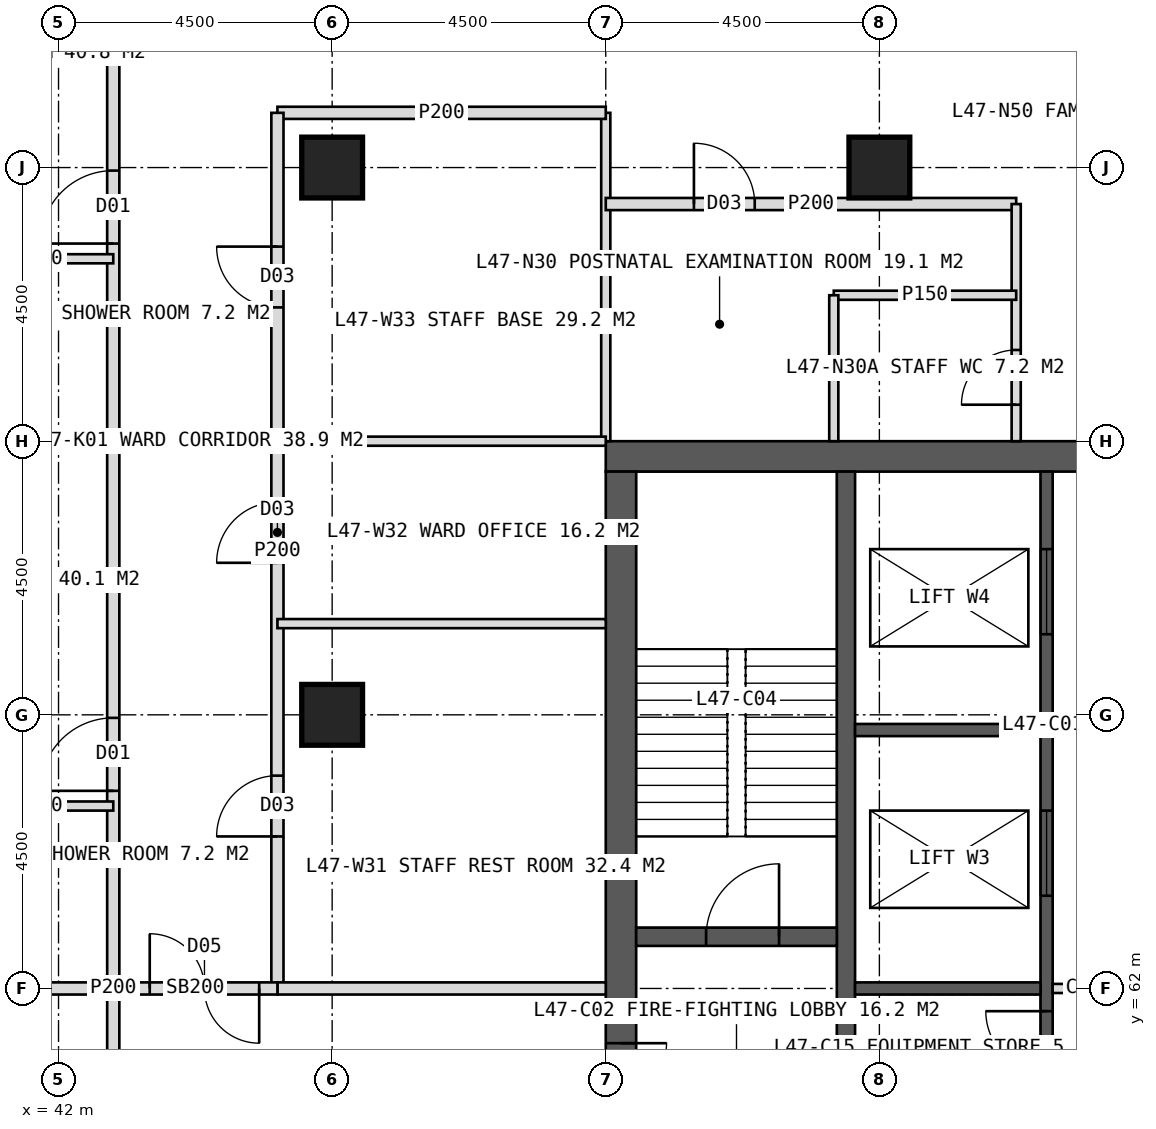
"""IFC4 building model, lengths in metres.
Left out: names, types, materials, properties, quantities, classifications, styles, units other than length and angle.
Written with IfcOpenShell. Run it as: python <this file> out.ifc"""

import sys

from ifc_helpers import new_model, si_unit, direction, frame, frame_2d, origin, origin_2d, place, context, subcontext, project, spatial, rectangle, hollow_rectangle, extrude, element, fill, save


model = new_model("IFC4")
c1 = context("Model", 3, precision=1e-05, world=origin(), true_north=direction((0.0, 1.0)))
c2 = subcontext(c1, "Body", "Model", "MODEL_VIEW")
j1 = project(units=[si_unit("LENGTHUNIT", "METRE"), si_unit("PLANEANGLEUNIT", "RADIAN")], contexts=[c1])
p1 = place(None, origin())
s1 = spatial("IfcSite", under=j1, at=p1, CompositionType="ELEMENT")
p2 = place(p1, origin())
s2 = spatial("IfcBuilding", under=s1, at=p2, CompositionType="ELEMENT")
p3 = place(p2, frame((0.0, 0.0, 197.0)))
s3 = spatial("IfcBuildingStorey", under=s2, at=p3, CompositionType="ELEMENT", Elevation=197.0)
p4 = place(p3, frame((51.0, 70.75, 0.0), z_axis=(0.0, 0.0, 1.0), x_axis=(1.0, 0.0, 0.0)))
e1 = element("IfcWall", 1, at=p4, inside=s3, PredefinedType="SHEAR", context=c2, shape_type="SweptSolid", body=[
    extrude(rectangle(XDim=18.0, YDim=0.5, at=frame_2d((9.0, 0.0))), origin(), (0.0, 0.0, 1.0), 4.0),
])
p5 = place(p4, frame((8.1, 0.0, 0.0)))
e2 = element("IfcOpeningElement", 2, at=p5, cuts=e1, PredefinedType="OPENING", context=c2, shape_type="SweptSolid", body=[
    extrude(rectangle(XDim=1.8, YDim=2.2, at=frame_2d((0.9, 1.1))), frame((0.0, 0.26, 0.0), z_axis=(0.0, -1.0, 0.0), x_axis=(1.0, 0.0, 0.0)), (0.0, 0.0, 1.0), 0.52),
])
p6 = place(p3, frame((51.25, 53.5, 0.0), z_axis=(0.0, 0.0, 1.0), x_axis=(0.0, 1.0, 0.0)))
e3 = element("IfcWall", 3, at=p6, inside=s3, PredefinedType="SHEAR", context=c2, shape_type="SweptSolid", body=[
    extrude(rectangle(XDim=17.0, YDim=0.5, at=frame_2d((8.5, 0.0))), origin(), (0.0, 0.0, 1.0), 4.0),
])
p7 = place(p6, frame((6.1, 0.0, 0.0)))
e4 = element("IfcOpeningElement", 4, at=p7, cuts=e3, PredefinedType="OPENING", context=c2, shape_type="SweptSolid", body=[
    extrude(rectangle(XDim=1.5, YDim=2.2, at=frame_2d((0.75, 1.1))), frame((0.0, 0.26, 0.0), z_axis=(0.0, -1.0, 0.0), x_axis=(1.0, 0.0, 0.0)), (0.0, 0.0, 1.0), 0.52),
])
p8 = place(p3, frame((54.95, 53.5, 0.0), z_axis=(0.0, 0.0, 1.0), x_axis=(0.0, 1.0, 0.0)))
e5 = element("IfcWall", 5, at=p8, inside=s3, PredefinedType="SHEAR", context=c2, shape_type="SweptSolid", body=[
    extrude(rectangle(XDim=17.0, YDim=0.3, at=frame_2d((8.5, 0.0))), origin(), (0.0, 0.0, 1.0), 4.0),
])
p9 = place(p3, frame((58.25, 53.5, 0.0), z_axis=(0.0, 0.0, 1.0), x_axis=(0.0, 1.0, 0.0)))
e6 = element("IfcWall", 6, at=p9, inside=s3, PredefinedType="SHEAR", context=c2, shape_type="SweptSolid", body=[
    extrude(rectangle(XDim=17.0, YDim=0.2, at=frame_2d((8.5, 0.0))), origin(), (0.0, 0.0, 1.0), 4.0),
])
p10 = place(p9, frame((0.496, 0.0, 0.0)))
e7 = element("IfcOpeningElement", 7, at=p10, cuts=e6, PredefinedType="OPENING", context=c2, shape_type="SweptSolid", body=[
    extrude(rectangle(XDim=1.0, YDim=2.1, at=frame_2d((0.5, 1.05))), frame((0.0, 0.11, 0.0), z_axis=(0.0, -1.0, 0.0), x_axis=(1.0, 0.0, 0.0)), (0.0, 0.0, 1.0), 0.22),
])
p11 = place(p9, frame((2.646, 0.0, 0.0)))
e8 = element("IfcOpeningElement", 8, at=p11, cuts=e6, PredefinedType="OPENING", context=c2, shape_type="SweptSolid", body=[
    extrude(rectangle(XDim=1.0, YDim=2.1, at=frame_2d((0.5, 1.05))), frame((0.0, 0.11, 0.0), z_axis=(0.0, -1.0, 0.0), x_axis=(1.0, 0.0, 0.0)), (0.0, 0.0, 1.0), 0.22),
])
p12 = place(p9, frame((5.027, 0.0, 0.0)))
e9 = element("IfcOpeningElement", 9, at=p12, cuts=e6, PredefinedType="OPENING", context=c2, shape_type="SweptSolid", body=[
    extrude(rectangle(XDim=1.0, YDim=2.1, at=frame_2d((0.5, 1.05))), frame((0.0, 0.11, 0.0), z_axis=(0.0, -1.0, 0.0), x_axis=(1.0, 0.0, 0.0)), (0.0, 0.0, 1.0), 0.22),
])
p13 = place(p9, frame((7.126, 0.0, 0.0)))
e10 = element("IfcOpeningElement", 10, at=p13, cuts=e6, PredefinedType="OPENING", context=c2, shape_type="SweptSolid", body=[
    extrude(rectangle(XDim=1.0, YDim=2.1, at=frame_2d((0.5, 1.05))), frame((0.0, 0.11, 0.0), z_axis=(0.0, -1.0, 0.0), x_axis=(1.0, 0.0, 0.0)), (0.0, 0.0, 1.0), 0.22),
])
p14 = place(p9, frame((10.025, 0.0, 0.0)))
e11 = element("IfcOpeningElement", 11, at=p14, cuts=e6, PredefinedType="OPENING", context=c2, shape_type="SweptSolid", body=[
    extrude(rectangle(XDim=1.4, YDim=2.2, at=frame_2d((0.7, 1.1))), frame((0.0, 0.11, 0.0), z_axis=(0.0, -1.0, 0.0), x_axis=(1.0, 0.0, 0.0)), (0.0, 0.0, 1.0), 0.22),
])
p15 = place(p9, frame((14.325, 0.0, 0.0)))
e12 = element("IfcOpeningElement", 12, at=p15, cuts=e6, PredefinedType="OPENING", context=c2, shape_type="SweptSolid", body=[
    extrude(rectangle(XDim=1.4, YDim=2.2, at=frame_2d((0.7, 1.1))), frame((0.0, 0.11, 0.0), z_axis=(0.0, -1.0, 0.0), x_axis=(1.0, 0.0, 0.0)), (0.0, 0.0, 1.0), 0.22),
])
for number, where, z_axis, x_axis in (
    (13, (55.1, 62.0, 0.0), (0.0, 0.0, 1.0), (1.0, 0.0, 0.0)),
    (14, (55.1, 66.25, 0.0), (0.0, 0.0, 1.0), (1.0, 0.0, 0.0)),
):
    element("IfcWall", number, at=place(p3, frame(where, z_axis=z_axis, x_axis=x_axis)), inside=s3, PredefinedType="SHEAR", context=c2, shape_type="SweptSolid", body=[
        extrude(rectangle(XDim=3.05, YDim=0.2, at=frame_2d((1.525, 0.0))), origin(), (0.0, 0.0, 1.0), 4.0),
    ])
p16 = place(p3, frame((51.5, 62.85, 0.0), z_axis=(0.0, 0.0, 1.0), x_axis=(1.0, 0.0, 0.0)))
e15 = element("IfcWall", 15, at=p16, inside=s3, PredefinedType="SHEAR", context=c2, shape_type="SweptSolid", body=[
    extrude(rectangle(XDim=3.3, YDim=0.3, at=frame_2d((1.65, 0.0))), origin(), (0.0, 0.0, 1.0), 4.0),
])
p17 = place(p16, frame((1.15, 0.0, 0.0)))
e16 = element("IfcOpeningElement", 16, at=p17, cuts=e15, PredefinedType="OPENING", context=c2, shape_type="SweptSolid", body=[
    extrude(rectangle(XDim=1.2, YDim=2.1, at=frame_2d((0.6, 1.05))), frame((0.0, 0.16, 0.0), z_axis=(0.0, -1.0, 0.0), x_axis=(1.0, 0.0, 0.0)), (0.0, 0.0, 1.0), 0.32),
])
for number, where, z_axis, x_axis in (
    (17, (46.5, 75.5, 0.0), (0.0, 0.0, 1.0), (1.0, 0.0, 0.0)),
    (18, (55.5, 75.5, 0.0), (0.0, 0.0, 1.0), (1.0, 0.0, 0.0)),
    (19, (46.5, 66.5, 0.0), (0.0, 0.0, 1.0), (1.0, 0.0, 0.0)),
):
    element("IfcColumn", number, at=place(p3, frame(where, z_axis=z_axis, x_axis=x_axis)), inside=s3, PredefinedType="COLUMN", context=c2, shape_type="SweptSolid", body=[
        extrude(hollow_rectangle(XDim=1.0, YDim=1.0, WallThickness=0.1, at=origin_2d()), origin(), (0.0, 0.0, 1.0), 4.0),
    ])
p18 = place(p3, frame((51.0, 71.0, 0.0), z_axis=(0.0, 0.0, 1.0), x_axis=(0.0, 1.0, 0.0)))
e20 = element("IfcWall", 20, at=p18, inside=s3, PredefinedType="PARTITIONING", context=c2, shape_type="SweptSolid", body=[
    extrude(rectangle(XDim=5.4, YDim=0.15, at=frame_2d((2.7, 0.0))), origin(), (0.0, 0.0, 1.0), 3.75),
])
p19 = place(p3, frame((45.6, 76.4, 0.0), z_axis=(0.0, 0.0, 1.0), x_axis=(1.0, 0.0, 0.0)))
e21 = element("IfcWall", 21, at=p19, inside=s3, PredefinedType="PARTITIONING", context=c2, shape_type="SweptSolid", body=[
    extrude(rectangle(XDim=5.4, YDim=0.2, at=frame_2d((2.7, 0.0))), origin(), (0.0, 0.0, 1.0), 3.75),
])
p20 = place(p3, frame((51.0, 74.9, 0.0), z_axis=(0.0, 0.0, 1.0), x_axis=(1.0, 0.0, 0.0)))
e22 = element("IfcWall", 22, at=p20, inside=s3, PredefinedType="PARTITIONING", context=c2, shape_type="SweptSolid", body=[
    extrude(rectangle(XDim=6.75, YDim=0.2, at=frame_2d((3.375, 0.0))), origin(), (0.0, 0.0, 1.0), 3.75),
])
p21 = place(p20, frame((1.45, 0.0, 0.0)))
e23 = element("IfcOpeningElement", 23, at=p21, cuts=e22, PredefinedType="OPENING", context=c2, shape_type="SweptSolid", body=[
    extrude(rectangle(XDim=1.0, YDim=2.1, at=frame_2d((0.5, 1.05))), frame((0.0, 0.11, 0.0), z_axis=(0.0, -1.0, 0.0), x_axis=(1.0, 0.0, 0.0)), (0.0, 0.0, 1.0), 0.22),
])
p22 = place(p3, frame((57.75, 71.0, 0.0), z_axis=(0.0, 0.0, 1.0), x_axis=(0.0, 1.0, 0.0)))
e24 = element("IfcWall", 24, at=p22, inside=s3, PredefinedType="PARTITIONING", context=c2, shape_type="SweptSolid", body=[
    extrude(rectangle(XDim=3.9, YDim=0.15, at=frame_2d((1.95, 0.0))), origin(), (0.0, 0.0, 1.0), 3.75),
])
p23 = place(p22, frame((0.6, 0.0, 0.0)))
e25 = element("IfcOpeningElement", 25, at=p23, cuts=e24, PredefinedType="OPENING", context=c2, shape_type="SweptSolid", body=[
    extrude(rectangle(XDim=0.9, YDim=2.1, at=frame_2d((0.45, 1.05))), frame((0.0, 0.085, 0.0), z_axis=(0.0, -1.0, 0.0), x_axis=(1.0, 0.0, 0.0)), (0.0, 0.0, 1.0), 0.17),
])
p24 = place(p3, frame((54.75, 73.4, 0.0), z_axis=(0.0, 0.0, 1.0), x_axis=(1.0, 0.0, 0.0)))
e26 = element("IfcWall", 26, at=p24, inside=s3, PredefinedType="PARTITIONING", context=c2, shape_type="SweptSolid", body=[
    extrude(rectangle(XDim=3.0, YDim=0.15, at=frame_2d((1.5, 0.0))), origin(), (0.0, 0.0, 1.0), 3.75),
])
p25 = place(p3, frame((54.75, 71.0, 0.0), z_axis=(0.0, 0.0, 1.0), x_axis=(0.0, 1.0, 0.0)))
e27 = element("IfcWall", 27, at=p25, inside=s3, PredefinedType="PARTITIONING", context=c2, shape_type="SweptSolid", body=[
    extrude(rectangle(XDim=2.4, YDim=0.15, at=frame_2d((1.2, 0.0))), origin(), (0.0, 0.0, 1.0), 3.75),
])
p26 = place(p3, frame((42.9, 62.0, 0.0), z_axis=(0.0, 0.0, 1.0), x_axis=(-1.0, 0.0, 0.0)))
e28 = element("IfcWall", 28, at=p26, inside=s3, PredefinedType="SOLIDWALL", context=c2, shape_type="SweptSolid", body=[
    extrude(rectangle(XDim=5.25, YDim=0.2, at=frame_2d((2.625, 0.0))), origin(), (0.0, 0.0, 1.0), 2.95),
])
p27 = place(p3, frame((42.9, 71.0, 0.0), z_axis=(0.0, 0.0, 1.0), x_axis=(-1.0, 0.0, 0.0)))
e29 = element("IfcWall", 29, at=p27, inside=s3, PredefinedType="PARTITIONING", context=c2, shape_type="SweptSolid", body=[
    extrude(rectangle(XDim=5.25, YDim=0.15, at=frame_2d((2.625, 0.0))), origin(), (0.0, 0.0, 1.0), 3.75),
])
p28 = place(p3, frame((42.9, 44.9, 0.0), z_axis=(0.0, 0.0, 1.0), x_axis=(0.0, 1.0, 0.0)))
e30 = element("IfcWall", 30, at=p28, inside=s3, PredefinedType="PARTITIONING", context=c2, shape_type="SweptSolid", body=[
    extrude(rectangle(XDim=34.2, YDim=0.2, at=frame_2d((17.1, 0.0))), origin(), (0.0, 0.0, 1.0), 3.75),
])
p29 = place(p28, frame((3.25, 0.0, 0.0)))
e31 = element("IfcOpeningElement", 31, at=p29, cuts=e30, PredefinedType="OPENING", context=c2, shape_type="SweptSolid", body=[
    extrude(rectangle(XDim=1.2, YDim=2.2, at=frame_2d((0.6, 1.1))), frame((0.0, 0.11, 0.0), z_axis=(0.0, -1.0, 0.0), x_axis=(1.0, 0.0, 0.0)), (0.0, 0.0, 1.0), 0.22),
])
p30 = place(p28, frame((11.35, 0.0, 0.0)))
e32 = element("IfcOpeningElement", 32, at=p30, cuts=e30, PredefinedType="OPENING", context=c2, shape_type="SweptSolid", body=[
    extrude(rectangle(XDim=1.2, YDim=2.2, at=frame_2d((0.6, 1.1))), frame((0.0, 0.11, 0.0), z_axis=(0.0, -1.0, 0.0), x_axis=(1.0, 0.0, 0.0)), (0.0, 0.0, 1.0), 0.22),
])
p31 = place(p28, frame((20.35, 0.0, 0.0)))
e33 = element("IfcOpeningElement", 33, at=p31, cuts=e30, PredefinedType="OPENING", context=c2, shape_type="SweptSolid", body=[
    extrude(rectangle(XDim=1.2, YDim=2.2, at=frame_2d((0.6, 1.1))), frame((0.0, 0.11, 0.0), z_axis=(0.0, -1.0, 0.0), x_axis=(1.0, 0.0, 0.0)), (0.0, 0.0, 1.0), 0.22),
])
p32 = place(p28, frame((29.35, 0.0, 0.0)))
e34 = element("IfcOpeningElement", 34, at=p32, cuts=e30, PredefinedType="OPENING", context=c2, shape_type="SweptSolid", body=[
    extrude(rectangle(XDim=1.2, YDim=2.2, at=frame_2d((0.6, 1.1))), frame((0.0, 0.11, 0.0), z_axis=(0.0, -1.0, 0.0), x_axis=(1.0, 0.0, 0.0)), (0.0, 0.0, 1.0), 0.22),
])
for number, where, z_axis, x_axis in (
    (35, (42.9, 65.0, 0.0), (0.0, 0.0, 1.0), (-1.0, 0.0, 0.0)),
    (36, (42.9, 74.0, 0.0), (0.0, 0.0, 1.0), (-1.0, 0.0, 0.0)),
):
    element("IfcWall", number, at=place(p3, frame(where, z_axis=z_axis, x_axis=x_axis)), inside=s3, PredefinedType="PARTITIONING", context=c2, shape_type="SweptSolid", body=[
        extrude(rectangle(XDim=2.4, YDim=0.15, at=frame_2d((1.2, 0.0))), origin(), (0.0, 0.0, 1.0), 3.75),
    ])
p33 = place(p3, frame((45.6, 62.0, 0.0), z_axis=(0.0, 0.0, 1.0), x_axis=(0.0, 1.0, 0.0)))
e37 = element("IfcWall", 37, at=p33, inside=s3, PredefinedType="PARTITIONING", context=c2, shape_type="SweptSolid", body=[
    extrude(rectangle(XDim=14.4, YDim=0.2, at=frame_2d((7.2, 0.0))), origin(), (0.0, 0.0, 1.0), 3.75),
])
p34 = place(p33, frame((2.5, 0.0, 0.0)))
e38 = element("IfcOpeningElement", 38, at=p34, cuts=e37, PredefinedType="OPENING", context=c2, shape_type="SweptSolid", body=[
    extrude(rectangle(XDim=1.0, YDim=2.1, at=frame_2d((0.5, 1.05))), frame((0.0, 0.11, 0.0), z_axis=(0.0, -1.0, 0.0), x_axis=(1.0, 0.0, 0.0)), (0.0, 0.0, 1.0), 0.22),
])
p35 = place(p33, frame((7.0, 0.0, 0.0)))
e39 = element("IfcOpeningElement", 39, at=p35, cuts=e37, PredefinedType="OPENING", context=c2, shape_type="SweptSolid", body=[
    extrude(rectangle(XDim=1.0, YDim=2.1, at=frame_2d((0.5, 1.05))), frame((0.0, 0.11, 0.0), z_axis=(0.0, -1.0, 0.0), x_axis=(1.0, 0.0, 0.0)), (0.0, 0.0, 1.0), 0.22),
])
p36 = place(p33, frame((11.2, 0.0, 0.0)))
e40 = element("IfcOpeningElement", 40, at=p36, cuts=e37, PredefinedType="OPENING", context=c2, shape_type="SweptSolid", body=[
    extrude(rectangle(XDim=1.0, YDim=2.1, at=frame_2d((0.5, 1.05))), frame((0.0, 0.11, 0.0), z_axis=(0.0, -1.0, 0.0), x_axis=(1.0, 0.0, 0.0)), (0.0, 0.0, 1.0), 0.22),
])
p37 = place(p3, frame((51.0, 62.0, 0.0), z_axis=(0.0, 0.0, 1.0), x_axis=(-1.0, 0.0, 0.0)))
e41 = element("IfcWall", 41, at=p37, inside=s3, PredefinedType="SOLIDWALL", context=c2, shape_type="SweptSolid", body=[
    extrude(rectangle(XDim=5.4, YDim=0.2, at=frame_2d((2.7, 0.0))), origin(), (0.0, 0.0, 1.0), 2.95),
])
for number, where, z_axis, x_axis in (
    (42, (51.0, 68.0, 0.0), (0.0, 0.0, 1.0), (-1.0, 0.0, 0.0)),
    (43, (51.0, 71.0, 0.0), (0.0, 0.0, 1.0), (-1.0, 0.0, 0.0)),
):
    element("IfcWall", number, at=place(p3, frame(where, z_axis=z_axis, x_axis=x_axis)), inside=s3, PredefinedType="PARTITIONING", context=c2, shape_type="SweptSolid", body=[
        extrude(rectangle(XDim=5.4, YDim=0.15, at=frame_2d((2.7, 0.0))), origin(), (0.0, 0.0, 1.0), 3.75),
    ])
p38 = place(p3, frame((45.6, 62.0, 0.0), z_axis=(0.0, 0.0, 1.0), x_axis=(-1.0, 0.0, 0.0)))
e44 = element("IfcWall", 44, at=p38, inside=s3, PredefinedType="SOLIDWALL", context=c2, shape_type="SweptSolid", body=[
    extrude(rectangle(XDim=2.7, YDim=0.2, at=frame_2d((1.35, 0.0))), origin(), (0.0, 0.0, 1.0), 2.95),
])
p39 = place(p38, frame((0.3, 0.0, 0.0)))
e45 = element("IfcOpeningElement", 45, at=p39, cuts=e44, PredefinedType="OPENING", context=c2, shape_type="SweptSolid", body=[
    extrude(rectangle(XDim=1.8, YDim=2.2, at=frame_2d((0.9, 1.1))), frame((0.0, 0.11, 0.0), z_axis=(0.0, -1.0, 0.0), x_axis=(1.0, 0.0, 0.0)), (0.0, 0.0, 1.0), 0.22),
])
p40 = place(p3, frame((58.35, 62.0, 0.0), z_axis=(0.0, 0.0, 1.0), x_axis=(1.0, 0.0, 0.0)))
e46 = element("IfcWall", 46, at=p40, inside=s3, PredefinedType="PARTITIONING", context=c2, shape_type="SweptSolid", body=[
    extrude(rectangle(XDim=3.3, YDim=0.15, at=frame_2d((1.65, 0.0))), origin(), (0.0, 0.0, 1.0), 3.75),
])
p41 = place(p23, origin())
e47 = element("IfcDoor", 47, at=p41, inside=s3, OperationType="SINGLE_SWING_LEFT", PredefinedType="DOOR", context=c2, shape_type="SweptSolid", body=[
    extrude(rectangle(XDim=0.9, YDim=2.1, at=frame_2d((0.45, 1.05))), frame((0.0, 0.025, 0.0), z_axis=(0.0, -1.0, 0.0), x_axis=(1.0, 0.0, 0.0)), (0.0, 0.0, 1.0), 0.05),
])
fill(e25, e47)
p42 = place(p21, origin())
e48 = element("IfcDoor", 48, at=p42, inside=s3, OperationType="SINGLE_SWING_LEFT", PredefinedType="DOOR", context=c2, shape_type="SweptSolid", body=[
    extrude(rectangle(XDim=1.0, YDim=2.1, at=frame_2d((0.5, 1.05))), frame((0.0, 0.025, 0.0), z_axis=(0.0, -1.0, 0.0), x_axis=(1.0, 0.0, 0.0)), (0.0, 0.0, 1.0), 0.05),
])
fill(e23, e48)
p43 = place(p31, origin())
e49 = element("IfcDoor", 49, at=p43, inside=s3, OperationType="SINGLE_SWING_LEFT", PredefinedType="DOOR", context=c2, shape_type="SweptSolid", body=[
    extrude(rectangle(XDim=1.2, YDim=2.2, at=frame_2d((0.6, 1.1))), frame((0.0, 0.025, 0.0), z_axis=(0.0, -1.0, 0.0), x_axis=(1.0, 0.0, 0.0)), (0.0, 0.0, 1.0), 0.05),
])
fill(e33, e49)
p44 = place(p32, origin())
e50 = element("IfcDoor", 50, at=p44, inside=s3, OperationType="SINGLE_SWING_LEFT", PredefinedType="DOOR", context=c2, shape_type="SweptSolid", body=[
    extrude(rectangle(XDim=1.2, YDim=2.2, at=frame_2d((0.6, 1.1))), frame((0.0, 0.025, 0.0), z_axis=(0.0, -1.0, 0.0), x_axis=(1.0, 0.0, 0.0)), (0.0, 0.0, 1.0), 0.05),
])
fill(e34, e50)
p45 = place(p34, origin())
e51 = element("IfcDoor", 51, at=p45, inside=s3, OperationType="SINGLE_SWING_LEFT", PredefinedType="DOOR", context=c2, shape_type="SweptSolid", body=[
    extrude(rectangle(XDim=1.0, YDim=2.1, at=frame_2d((0.5, 1.05))), frame((0.0, 0.025, 0.0), z_axis=(0.0, -1.0, 0.0), x_axis=(1.0, 0.0, 0.0)), (0.0, 0.0, 1.0), 0.05),
])
fill(e38, e51)
p46 = place(p35, origin())
e52 = element("IfcDoor", 52, at=p46, inside=s3, OperationType="SINGLE_SWING_LEFT", PredefinedType="DOOR", context=c2, shape_type="SweptSolid", body=[
    extrude(rectangle(XDim=1.0, YDim=2.1, at=frame_2d((0.5, 1.05))), frame((0.0, 0.025, 0.0), z_axis=(0.0, -1.0, 0.0), x_axis=(1.0, 0.0, 0.0)), (0.0, 0.0, 1.0), 0.05),
])
fill(e39, e52)
p47 = place(p36, origin())
e53 = element("IfcDoor", 53, at=p47, inside=s3, OperationType="SINGLE_SWING_RIGHT", PredefinedType="DOOR", context=c2, shape_type="SweptSolid", body=[
    extrude(rectangle(XDim=1.0, YDim=2.1, at=frame_2d((0.5, 1.05))), frame((0.0, 0.025, 0.0), z_axis=(0.0, -1.0, 0.0), x_axis=(1.0, 0.0, 0.0)), (0.0, 0.0, 1.0), 0.05),
])
fill(e40, e53)
p48 = place(p39, origin())
e54 = element("IfcDoor", 54, at=p48, inside=s3, OperationType="DOUBLE_DOOR_DOUBLE_SWING", PredefinedType="DOOR", context=c2, shape_type="SweptSolid", body=[
    extrude(rectangle(XDim=1.8, YDim=2.2, at=frame_2d((0.9, 1.1))), frame((0.0, 0.025, 0.0), z_axis=(0.0, -1.0, 0.0), x_axis=(1.0, 0.0, 0.0)), (0.0, 0.0, 1.0), 0.05),
])
fill(e45, e54)
p49 = place(p7, origin())
e55 = element("IfcDoor", 55, at=p49, inside=s3, OperationType="DOUBLE_DOOR_SINGLE_SWING", PredefinedType="DOOR", context=c2, shape_type="SweptSolid", body=[
    extrude(rectangle(XDim=1.5, YDim=2.2, at=frame_2d((0.75, 1.1))), frame((0.0, 0.025, 0.0), z_axis=(0.0, -1.0, 0.0), x_axis=(1.0, 0.0, 0.0)), (0.0, 0.0, 1.0), 0.05),
])
fill(e4, e55)
p50 = place(p17, origin())
e56 = element("IfcDoor", 56, at=p50, inside=s3, OperationType="SINGLE_SWING_RIGHT", PredefinedType="DOOR", context=c2, shape_type="SweptSolid", body=[
    extrude(rectangle(XDim=1.2, YDim=2.1, at=frame_2d((0.6, 1.05))), frame((0.0, 0.025, 0.0), z_axis=(0.0, -1.0, 0.0), x_axis=(1.0, 0.0, 0.0)), (0.0, 0.0, 1.0), 0.05),
])
fill(e16, e56)
p51 = place(p13, origin())
e57 = element("IfcDoor", 57, at=p51, inside=s3, OperationType="SINGLE_SWING_RIGHT", PredefinedType="DOOR", context=c2, shape_type="SweptSolid", body=[
    extrude(rectangle(XDim=1.0, YDim=2.1, at=frame_2d((0.5, 1.05))), frame((0.0, 0.025, 0.0), z_axis=(0.0, -1.0, 0.0), x_axis=(1.0, 0.0, 0.0)), (0.0, 0.0, 1.0), 0.05),
])
fill(e10, e57)
p52 = place(p14, origin())
e58 = element("IfcDoor", 58, at=p52, inside=s3, OperationType="SLIDING_TO_LEFT", PredefinedType="DOOR", context=c2, shape_type="SweptSolid", body=[
    extrude(rectangle(XDim=1.4, YDim=2.2, at=frame_2d((0.7, 1.1))), frame((0.0, 0.025, 0.0), z_axis=(0.0, -1.0, 0.0), x_axis=(1.0, 0.0, 0.0)), (0.0, 0.0, 1.0), 0.05),
])
fill(e11, e58)
p53 = place(p15, origin())
e59 = element("IfcDoor", 59, at=p53, inside=s3, OperationType="SLIDING_TO_LEFT", PredefinedType="DOOR", context=c2, shape_type="SweptSolid", body=[
    extrude(rectangle(XDim=1.4, YDim=2.2, at=frame_2d((0.7, 1.1))), frame((0.0, 0.025, 0.0), z_axis=(0.0, -1.0, 0.0), x_axis=(1.0, 0.0, 0.0)), (0.0, 0.0, 1.0), 0.05),
])
fill(e12, e59)
save(model, sys.argv[1])
